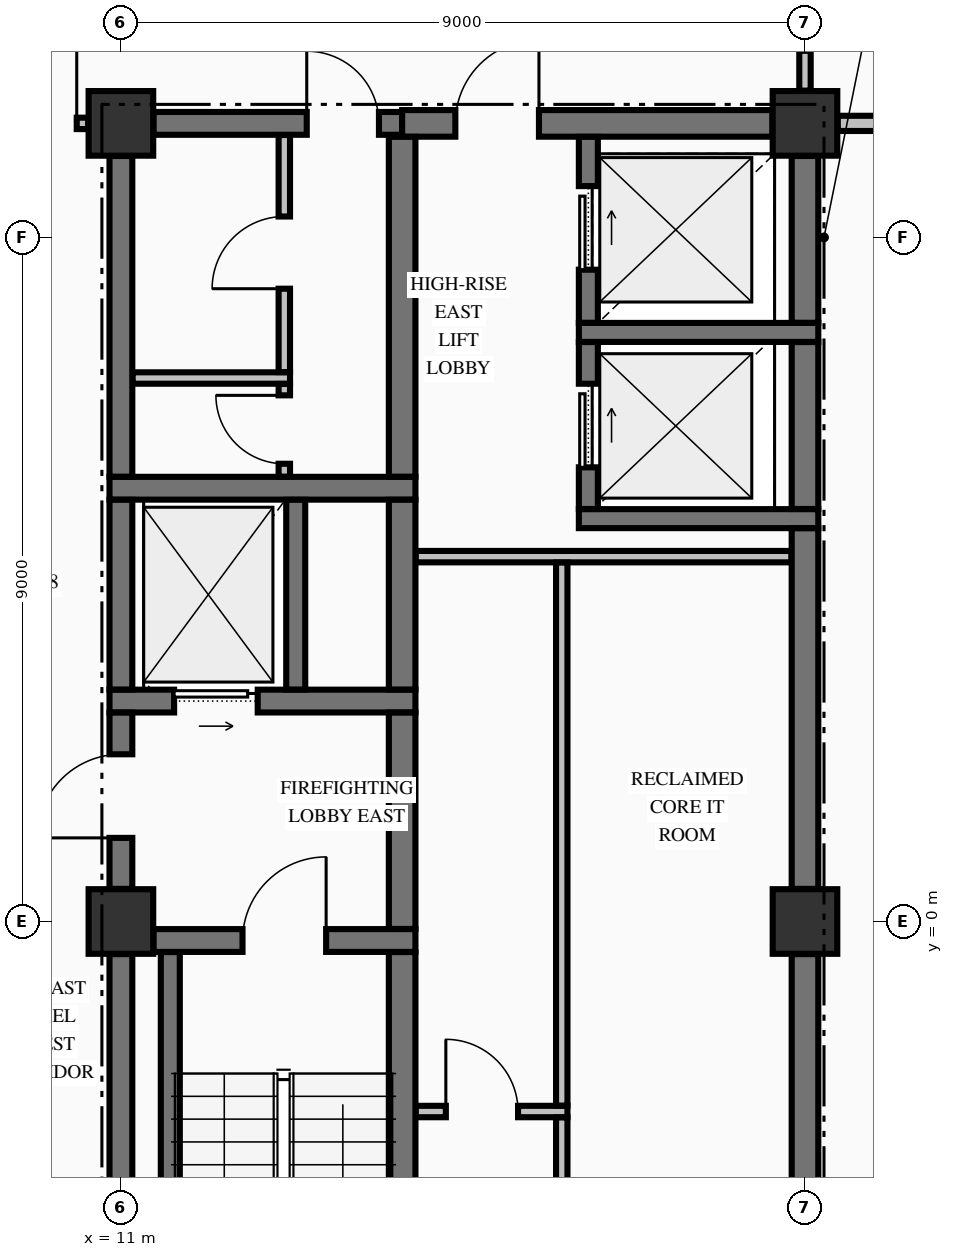
"""IFC4 building model, lengths in metres.
Left out: names, types, materials, properties, quantities, classifications, styles, units other than length and angle.
Written with IfcOpenShell. Run it as: python <this file> out.ifc"""

import sys

from ifc_helpers import new_model, si_unit, direction, frame, frame_2d, origin, origin_2d, place, context, subcontext, project, spatial, rectangle, extrude, element, fill, save


model = new_model("IFC4")
c1 = context("Model", 3, precision=1e-05, world=origin(), true_north=direction((0.0, 1.0)))
c2 = subcontext(c1, "Body", "Model", "MODEL_VIEW")
j1 = project(units=[si_unit("LENGTHUNIT", "METRE"), si_unit("PLANEANGLEUNIT", "RADIAN")], contexts=[c1])
p1 = place(None, origin())
s1 = spatial("IfcSite", under=j1, at=p1, CompositionType="ELEMENT")
p2 = place(p1, origin())
s2 = spatial("IfcBuilding", under=s1, at=p2, CompositionType="ELEMENT")
p3 = place(p2, frame((0.0, 0.0, 176.26)))
s3 = spatial("IfcBuildingStorey", under=s2, at=p3, CompositionType="ELEMENT", Elevation=176.26)
for number, where, z_axis, x_axis in (
    (1, (11.0, 0.0, -0.275), (0.0, 0.0, 1.0), (1.0, 0.0, 0.0)),
    (2, (11.0, 10.5, -0.275), (0.0, 0.0, 1.0), (1.0, 0.0, 0.0)),
    (3, (20.0, 10.5, -0.275), (0.0, 0.0, 1.0), (1.0, 0.0, 0.0)),
    (4, (20.0, 0.0, -0.275), (0.0, 0.0, 1.0), (1.0, 0.0, 0.0)),
):
    element("IfcColumn", number, at=place(p3, frame(where, z_axis=z_axis, x_axis=x_axis)), inside=s3, PredefinedType="COLUMN", context=c2, shape_type="SweptSolid", body=[
        extrude(rectangle(XDim=0.85, YDim=0.85, at=origin_2d()), origin(), (0.0, 0.0, 1.0), 3.425),
    ])
p4 = place(p3, frame((11.429, -0.25, 0.0), z_axis=(0.0, 0.0, 1.0), x_axis=(1.0, 0.0, 0.0)))
e5 = element("IfcWall", 5, at=p4, inside=s3, PredefinedType="SHEAR", context=c2, shape_type="SweptSolid", body=[
    extrude(rectangle(XDim=3.446, YDim=0.3, at=frame_2d((1.723, 0.0))), origin(), (0.0, 0.0, 1.0), 3.15),
])
p5 = place(p4, frame((1.171, 0.0, 0.0)))
e6 = element("IfcOpeningElement", 6, at=p5, cuts=e5, PredefinedType="OPENING", context=c2, shape_type="SweptSolid", body=[
    extrude(rectangle(XDim=1.1, YDim=2.15, at=frame_2d((0.55, 1.075))), frame((0.0, 0.16, 0.0), z_axis=(0.0, -1.0, 0.0), x_axis=(1.0, 0.0, 0.0)), (0.0, 0.0, 1.0), 0.32),
])
p6 = place(p3, frame((10.85, 2.9, 0.0), z_axis=(0.0, 0.0, 1.0), x_axis=(1.0, 0.0, 0.0)))
e7 = element("IfcWall", 7, at=p6, inside=s3, PredefinedType="SHEAR", context=c2, shape_type="SweptSolid", body=[
    extrude(rectangle(XDim=4.025, YDim=0.3, at=frame_2d((2.012, 0.0))), origin(), (0.0, 0.0, 1.0), 3.15),
])
p7 = place(p6, frame((0.85, 0.0, 0.0)))
e8 = element("IfcOpeningElement", 8, at=p7, cuts=e7, PredefinedType="OPENING", context=c2, shape_type="SweptSolid", body=[
    extrude(rectangle(XDim=1.1, YDim=2.2, at=frame_2d((0.55, 1.1))), frame((0.0, 0.16, 0.0), z_axis=(0.0, -1.0, 0.0), x_axis=(1.0, 0.0, 0.0)), (0.0, 0.0, 1.0), 0.32),
])
p8 = place(p3, frame((17.025, 5.3, 0.0), z_axis=(0.0, 0.0, 1.0), x_axis=(1.0, 0.0, 0.0)))
e9 = element("IfcWall", 9, at=p8, inside=s3, PredefinedType="SOLIDWALL", context=c2, shape_type="SweptSolid", body=[
    extrude(rectangle(XDim=3.15, YDim=0.25, at=frame_2d((1.575, 0.0))), origin(), (0.0, 0.0, 1.0), 3.15),
])
p9 = place(p3, frame((10.85, 5.7, 0.0), z_axis=(0.0, 0.0, 1.0), x_axis=(1.0, 0.0, 0.0)))
e10 = element("IfcWall", 10, at=p9, inside=s3, PredefinedType="SHEAR", context=c2, shape_type="SweptSolid", body=[
    extrude(rectangle(XDim=4.025, YDim=0.3, at=frame_2d((2.012, 0.0))), origin(), (0.0, 0.0, 1.0), 3.15),
])
p10 = place(p3, frame((17.025, 7.75, 0.0), z_axis=(0.0, 0.0, 1.0), x_axis=(1.0, 0.0, 0.0)))
e11 = element("IfcWall", 11, at=p10, inside=s3, PredefinedType="SOLIDWALL", context=c2, shape_type="SweptSolid", body=[
    extrude(rectangle(XDim=3.15, YDim=0.25, at=frame_2d((1.575, 0.0))), origin(), (0.0, 0.0, 1.0), 3.15),
])
p11 = place(p3, frame((11.429, 10.5, 0.0), z_axis=(0.0, 0.0, 1.0), x_axis=(1.0, 0.0, 0.0)))
e12 = element("IfcWall", 12, at=p11, inside=s3, PredefinedType="SHEAR", context=c2, shape_type="SweptSolid", body=[
    extrude(rectangle(XDim=3.271, YDim=0.3, at=frame_2d((1.635, 0.0))), origin(), (0.0, 0.0, 1.0), 3.15),
])
p12 = place(p11, frame((2.016, 0.0, 0.0)))
e13 = element("IfcOpeningElement", 13, at=p12, cuts=e12, PredefinedType="OPENING", context=c2, shape_type="SweptSolid", body=[
    extrude(rectangle(XDim=0.95, YDim=2.15, at=frame_2d((0.475, 1.075))), frame((0.0, 0.16, 0.0), z_axis=(0.0, -1.0, 0.0), x_axis=(1.0, 0.0, 0.0)), (0.0, 0.0, 1.0), 0.32),
])
p13 = place(p3, frame((14.7, 10.5, 0.0), z_axis=(0.0, 0.0, 1.0), x_axis=(1.0, 0.0, 0.0)))
e14 = element("IfcWall", 14, at=p13, inside=s3, PredefinedType="SHEAR", context=c2, shape_type="SweptSolid", body=[
    extrude(rectangle(XDim=4.871, YDim=0.35, at=frame_2d((2.436, 0.0))), origin(), (0.0, 0.0, 1.0), 3.15),
])
p14 = place(p13, frame((0.7, 0.0, 0.0)))
e15 = element("IfcOpeningElement", 15, at=p14, cuts=e14, PredefinedType="OPENING", context=c2, shape_type="SweptSolid", body=[
    extrude(rectangle(XDim=1.1, YDim=2.15, at=frame_2d((0.55, 1.075))), frame((0.0, 0.185, 0.0), z_axis=(0.0, -1.0, 0.0), x_axis=(1.0, 0.0, 0.0)), (0.0, 0.0, 1.0), 0.37),
])
p15 = place(p3, frame((14.878, -2.5, 0.0), z_axis=(0.0, 0.0, 1.0), x_axis=(1.0, 0.0, 0.0)))
e16 = element("IfcWall", 16, at=p15, inside=s3, PredefinedType="PARTITIONING", context=c2, shape_type="SweptSolid", body=[
    extrude(rectangle(XDim=1.997, YDim=0.15, at=frame_2d((0.999, 0.0))), origin(), (0.0, 0.0, 1.0), 3.15),
])
p16 = place(p15, frame((0.397, 0.0, 0.0)))
e17 = element("IfcOpeningElement", 17, at=p16, cuts=e16, PredefinedType="OPENING", context=c2, shape_type="SweptSolid", body=[
    extrude(rectangle(XDim=0.95, YDim=2.15, at=frame_2d((0.475, 1.075))), frame((0.0, 0.085, 0.0), z_axis=(0.0, -1.0, 0.0), x_axis=(1.0, 0.0, 0.0)), (0.0, 0.0, 1.0), 0.17),
])
p17 = place(p3, frame((14.878, 4.8, 0.0), z_axis=(0.0, 0.0, 1.0), x_axis=(1.0, 0.0, 0.0)))
e18 = element("IfcWall", 18, at=p17, inside=s3, PredefinedType="PARTITIONING", context=c2, shape_type="SweptSolid", body=[
    extrude(rectangle(XDim=4.944, YDim=0.15, at=frame_2d((2.472, 0.0))), origin(), (0.0, 0.0, 1.0), 3.15),
])
p18 = place(p3, frame((11.153, 7.15, 0.0), z_axis=(0.0, 0.0, 1.0), x_axis=(1.0, 0.0, 0.0)))
e19 = element("IfcWall", 19, at=p18, inside=s3, PredefinedType="PARTITIONING", context=c2, shape_type="SweptSolid", body=[
    extrude(rectangle(XDim=2.072, YDim=0.15, at=frame_2d((1.036, 0.0))), origin(), (0.0, 0.0, 1.0), 3.15),
])
p19 = place(p3, frame((-10.569, 10.5, 0.0), z_axis=(0.0, 0.0, 1.0), x_axis=(1.0, 0.0, 0.0)))
e20 = element("IfcWall", 20, at=p19, inside=s3, PredefinedType="PARTITIONING", context=c2, shape_type="SweptSolid", body=[
    extrude(rectangle(XDim=21.138, YDim=0.15, at=frame_2d((10.569, 0.0))), origin(), (0.0, 0.0, 1.0), 3.15),
])
p20 = place(p19, frame((0.15, 0.0, 0.0)))
e21 = element("IfcOpeningElement", 21, at=p20, cuts=e20, PredefinedType="OPENING", context=c2, shape_type="SweptSolid", body=[
    extrude(rectangle(XDim=1.05, YDim=2.15, at=frame_2d((0.525, 1.075))), frame((0.0, 0.085, 0.0), z_axis=(0.0, -1.0, 0.0), x_axis=(1.0, 0.0, 0.0)), (0.0, 0.0, 1.0), 0.17),
])
p21 = place(p19, frame((19.938, 0.0, 0.0)))
e22 = element("IfcOpeningElement", 22, at=p21, cuts=e20, PredefinedType="OPENING", context=c2, shape_type="SweptSolid", body=[
    extrude(rectangle(XDim=1.05, YDim=2.15, at=frame_2d((0.525, 1.075))), frame((0.0, 0.085, 0.0), z_axis=(0.0, -1.0, 0.0), x_axis=(1.0, 0.0, 0.0)), (0.0, 0.0, 1.0), 0.17),
])
p22 = place(p3, frame((20.431, 10.5, 0.0), z_axis=(0.0, 0.0, 1.0), x_axis=(1.0, 0.0, 0.0)))
e23 = element("IfcWall", 23, at=p22, inside=s3, PredefinedType="PARTITIONING", context=c2, shape_type="SweptSolid", body=[
    extrude(rectangle(XDim=6.404, YDim=0.2, at=frame_2d((3.202, 0.0))), origin(), (0.0, 0.0, 1.0), 3.15),
])
p23 = place(p22, frame((2.594, 0.0, 0.0)))
e24 = element("IfcOpeningElement", 24, at=p23, cuts=e23, PredefinedType="OPENING", context=c2, shape_type="SweptSolid", body=[
    extrude(rectangle(XDim=0.95, YDim=2.15, at=frame_2d((0.475, 1.075))), frame((0.0, 0.11, 0.0), z_axis=(0.0, -1.0, 0.0), x_axis=(1.0, 0.0, 0.0)), (0.0, 0.0, 1.0), 0.22),
])
p24 = place(p3, frame((11.0, -9.521, 0.0), z_axis=(0.0, 0.0, 1.0), x_axis=(0.0, 1.0, 0.0)))
e25 = element("IfcWall", 25, at=p24, inside=s3, PredefinedType="SHEAR", context=c2, shape_type="SweptSolid", body=[
    extrude(rectangle(XDim=9.092, YDim=0.3, at=frame_2d((4.546, 0.0))), origin(), (0.0, 0.0, 1.0), 3.15),
])
p25 = place(p3, frame((11.0, 0.429, 0.0), z_axis=(0.0, 0.0, 1.0), x_axis=(0.0, 1.0, 0.0)))
e26 = element("IfcWall", 26, at=p25, inside=s3, PredefinedType="SHEAR", context=c2, shape_type="SweptSolid", body=[
    extrude(rectangle(XDim=2.319, YDim=0.3, at=frame_2d((1.16, 0.0))), origin(), (0.0, 0.0, 1.0), 3.15),
])
p26 = place(p25, frame((0.671, 0.0, 0.0)))
e27 = element("IfcOpeningElement", 27, at=p26, cuts=e26, PredefinedType="OPENING", context=c2, shape_type="SweptSolid", body=[
    extrude(rectangle(XDim=1.1, YDim=2.15, at=frame_2d((0.55, 1.075))), frame((0.0, 0.16, 0.0), z_axis=(0.0, -1.0, 0.0), x_axis=(1.0, 0.0, 0.0)), (0.0, 0.0, 1.0), 0.32),
])
p27 = place(p3, frame((11.0, 3.052, 0.0), z_axis=(0.0, 0.0, 1.0), x_axis=(0.0, 1.0, 0.0)))
e28 = element("IfcWall", 28, at=p27, inside=s3, PredefinedType="SHEAR", context=c2, shape_type="SweptSolid", body=[
    extrude(rectangle(XDim=2.496, YDim=0.3, at=frame_2d((1.248, 0.0))), origin(), (0.0, 0.0, 1.0), 3.15),
])
p28 = place(p3, frame((11.0, 5.852, 0.0), z_axis=(0.0, 0.0, 1.0), x_axis=(0.0, 1.0, 0.0)))
e29 = element("IfcWall", 29, at=p28, inside=s3, PredefinedType="SHEAR", context=c2, shape_type="SweptSolid", body=[
    extrude(rectangle(XDim=4.219, YDim=0.3, at=frame_2d((2.109, 0.0))), origin(), (0.0, 0.0, 1.0), 3.15),
])
p29 = place(p3, frame((11.65, -9.798, 0.0), z_axis=(0.0, 0.0, 1.0), x_axis=(0.0, 1.0, 0.0)))
e30 = element("IfcWall", 30, at=p29, inside=s3, PredefinedType="SOLIDWALL", context=c2, shape_type="SweptSolid", body=[
    extrude(rectangle(XDim=9.396, YDim=0.25, at=frame_2d((4.698, 0.0))), origin(), (0.0, 0.0, 1.0), 3.15),
])
p30 = place(p3, frame((13.3, 3.052, 0.0), z_axis=(0.0, 0.0, 1.0), x_axis=(0.0, 1.0, 0.0)))
e31 = element("IfcWall", 31, at=p30, inside=s3, PredefinedType="SOLIDWALL", context=c2, shape_type="SweptSolid", body=[
    extrude(rectangle(XDim=2.496, YDim=0.25, at=frame_2d((1.248, 0.0))), origin(), (0.0, 0.0, 1.0), 3.15),
])
p31 = place(p3, frame((14.7, -9.773, 0.0), z_axis=(0.0, 0.0, 1.0), x_axis=(0.0, 1.0, 0.0)))
e32 = element("IfcWall", 32, at=p31, inside=s3, PredefinedType="SHEAR", context=c2, shape_type="SweptSolid", body=[
    extrude(rectangle(XDim=9.371, YDim=0.35, at=frame_2d((4.686, 0.0))), origin(), (0.0, 0.0, 1.0), 3.15),
])
p32 = place(p3, frame((14.7, -0.098, 0.0), z_axis=(0.0, 0.0, 1.0), x_axis=(0.0, 1.0, 0.0)))
e33 = element("IfcWall", 33, at=p32, inside=s3, PredefinedType="SHEAR", context=c2, shape_type="SweptSolid", body=[
    extrude(rectangle(XDim=2.846, YDim=0.35, at=frame_2d((1.423, 0.0))), origin(), (0.0, 0.0, 1.0), 3.15),
])
p33 = place(p3, frame((14.7, 3.052, 0.0), z_axis=(0.0, 0.0, 1.0), x_axis=(0.0, 1.0, 0.0)))
e34 = element("IfcWall", 34, at=p33, inside=s3, PredefinedType="SHEAR", context=c2, shape_type="SweptSolid", body=[
    extrude(rectangle(XDim=2.496, YDim=0.35, at=frame_2d((1.248, 0.0))), origin(), (0.0, 0.0, 1.0), 3.15),
])
p34 = place(p3, frame((14.7, 5.852, 0.0), z_axis=(0.0, 0.0, 1.0), x_axis=(0.0, 1.0, 0.0)))
e35 = element("IfcWall", 35, at=p34, inside=s3, PredefinedType="SHEAR", context=c2, shape_type="SweptSolid", body=[
    extrude(rectangle(XDim=4.471, YDim=0.35, at=frame_2d((2.235, 0.0))), origin(), (0.0, 0.0, 1.0), 3.15),
])
p35 = place(p3, frame((17.15, 5.427, 0.0), z_axis=(0.0, 0.0, 1.0), x_axis=(0.0, 1.0, 0.0)))
e36 = element("IfcWall", 36, at=p35, inside=s3, PredefinedType="SOLIDWALL", context=c2, shape_type="SweptSolid", body=[
    extrude(rectangle(XDim=2.196, YDim=0.25, at=frame_2d((1.098, 0.0))), origin(), (0.0, 0.0, 1.0), 3.15),
])
p36 = place(p35, frame((0.548, 0.0, 0.0)))
e37 = element("IfcOpeningElement", 37, at=p36, cuts=e36, PredefinedType="OPENING", context=c2, shape_type="SweptSolid", body=[
    extrude(rectangle(XDim=1.1, YDim=2.2, at=frame_2d((0.55, 1.1))), frame((0.0, 0.135, 0.0), z_axis=(0.0, -1.0, 0.0), x_axis=(1.0, 0.0, 0.0)), (0.0, 0.0, 1.0), 0.27),
])
p37 = place(p3, frame((17.15, 7.877, 0.0), z_axis=(0.0, 0.0, 1.0), x_axis=(0.0, 1.0, 0.0)))
e38 = element("IfcWall", 38, at=p37, inside=s3, PredefinedType="SOLIDWALL", context=c2, shape_type="SweptSolid", body=[
    extrude(rectangle(XDim=2.446, YDim=0.25, at=frame_2d((1.223, 0.0))), origin(), (0.0, 0.0, 1.0), 3.15),
])
p38 = place(p37, frame((0.698, 0.0, 0.0)))
e39 = element("IfcOpeningElement", 39, at=p38, cuts=e38, PredefinedType="OPENING", context=c2, shape_type="SweptSolid", body=[
    extrude(rectangle(XDim=1.1, YDim=2.2, at=frame_2d((0.55, 1.1))), frame((0.0, 0.135, 0.0), z_axis=(0.0, -1.0, 0.0), x_axis=(1.0, 0.0, 0.0)), (0.0, 0.0, 1.0), 0.27),
])
p39 = place(p3, frame((20.0, -9.521, 0.0), z_axis=(0.0, 0.0, 1.0), x_axis=(0.0, 1.0, 0.0)))
e40 = element("IfcWall", 40, at=p39, inside=s3, PredefinedType="SHEAR", context=c2, shape_type="SweptSolid", body=[
    extrude(rectangle(XDim=9.092, YDim=0.35, at=frame_2d((4.546, 0.0))), origin(), (0.0, 0.0, 1.0), 3.15),
])
p40 = place(p3, frame((20.0, 0.429, 0.0), z_axis=(0.0, 0.0, 1.0), x_axis=(0.0, 1.0, 0.0)))
e41 = element("IfcWall", 41, at=p40, inside=s3, PredefinedType="SHEAR", context=c2, shape_type="SweptSolid", body=[
    extrude(rectangle(XDim=4.744, YDim=0.35, at=frame_2d((2.372, 0.0))), origin(), (0.0, 0.0, 1.0), 3.15),
])
p41 = place(p3, frame((20.0, 5.427, 0.0), z_axis=(0.0, 0.0, 1.0), x_axis=(0.0, 1.0, 0.0)))
e42 = element("IfcWall", 42, at=p41, inside=s3, PredefinedType="SHEAR", context=c2, shape_type="SweptSolid", body=[
    extrude(rectangle(XDim=2.196, YDim=0.35, at=frame_2d((1.098, 0.0))), origin(), (0.0, 0.0, 1.0), 3.15),
])
p42 = place(p3, frame((20.0, 7.877, 0.0), z_axis=(0.0, 0.0, 1.0), x_axis=(0.0, 1.0, 0.0)))
e43 = element("IfcWall", 43, at=p42, inside=s3, PredefinedType="SHEAR", context=c2, shape_type="SweptSolid", body=[
    extrude(rectangle(XDim=2.194, YDim=0.35, at=frame_2d((1.097, 0.0))), origin(), (0.0, 0.0, 1.0), 3.15),
])
p43 = place(p3, frame((13.15, 5.853, 0.0), z_axis=(0.0, 0.0, 1.0), x_axis=(0.0, 1.0, 0.0)))
e44 = element("IfcWall", 44, at=p43, inside=s3, PredefinedType="PARTITIONING", context=c2, shape_type="SweptSolid", body=[
    extrude(rectangle(XDim=1.219, YDim=0.15, at=frame_2d((0.609, 0.0))), origin(), (0.0, 0.0, 1.0), 3.15),
])
p44 = place(p43, frame((0.169, 0.0, 0.0)))
e45 = element("IfcOpeningElement", 45, at=p44, cuts=e44, PredefinedType="OPENING", context=c2, shape_type="SweptSolid", body=[
    extrude(rectangle(XDim=0.9, YDim=2.15, at=frame_2d((0.45, 1.075))), frame((0.0, 0.085, 0.0), z_axis=(0.0, -1.0, 0.0), x_axis=(1.0, 0.0, 0.0)), (0.0, 0.0, 1.0), 0.17),
])
p45 = place(p3, frame((13.15, 7.228, 0.0), z_axis=(0.0, 0.0, 1.0), x_axis=(0.0, 1.0, 0.0)))
e46 = element("IfcWall", 46, at=p45, inside=s3, PredefinedType="PARTITIONING", context=c2, shape_type="SweptSolid", body=[
    extrude(rectangle(XDim=3.119, YDim=0.15, at=frame_2d((1.56, 0.0))), origin(), (0.0, 0.0, 1.0), 3.15),
])
p46 = place(p45, frame((1.097, 0.0, 0.0)))
e47 = element("IfcOpeningElement", 47, at=p46, cuts=e46, PredefinedType="OPENING", context=c2, shape_type="SweptSolid", body=[
    extrude(rectangle(XDim=0.95, YDim=2.15, at=frame_2d((0.475, 1.075))), frame((0.0, 0.085, 0.0), z_axis=(0.0, -1.0, 0.0), x_axis=(1.0, 0.0, 0.0)), (0.0, 0.0, 1.0), 0.17),
])
p47 = place(p3, frame((16.8, -9.772, 0.0), z_axis=(0.0, 0.0, 1.0), x_axis=(0.0, 1.0, 0.0)))
e48 = element("IfcWall", 48, at=p47, inside=s3, PredefinedType="PARTITIONING", context=c2, shape_type="SweptSolid", body=[
    extrude(rectangle(XDim=7.194, YDim=0.15, at=frame_2d((3.597, 0.0))), origin(), (0.0, 0.0, 1.0), 3.15),
])
p48 = place(p3, frame((16.8, -2.422, 0.0), z_axis=(0.0, 0.0, 1.0), x_axis=(0.0, 1.0, 0.0)))
e49 = element("IfcWall", 49, at=p48, inside=s3, PredefinedType="PARTITIONING", context=c2, shape_type="SweptSolid", body=[
    extrude(rectangle(XDim=7.144, YDim=0.15, at=frame_2d((3.572, 0.0))), origin(), (0.0, 0.0, 1.0), 3.15),
])
p49 = place(p3, frame((20.0, 10.931, 0.0), z_axis=(0.0, 0.0, 1.0), x_axis=(0.0, 1.0, 0.0)))
e50 = element("IfcWall", 50, at=p49, inside=s3, PredefinedType="PARTITIONING", context=c2, shape_type="SweptSolid", body=[
    extrude(rectangle(XDim=2.316, YDim=0.15, at=frame_2d((1.158, 0.0))), origin(), (0.0, 0.0, 1.0), 2.342),
])
p50 = place(p49, frame((0.524, 0.0, 0.0)))
e51 = element("IfcOpeningElement", 51, at=p50, cuts=e50, PredefinedType="OPENING", context=c2, shape_type="SweptSolid", body=[
    extrude(rectangle(XDim=0.95, YDim=2.15, at=frame_2d((0.475, 1.075))), frame((0.0, 0.085, 0.0), z_axis=(0.0, -1.0, 0.0), x_axis=(1.0, 0.0, 0.0)), (0.0, 0.0, 1.0), 0.17),
])
p51 = place(p5, origin())
e52 = element("IfcDoor", 52, at=p51, inside=s3, OperationType="SINGLE_SWING_RIGHT", PredefinedType="DOOR", context=c2, shape_type="SweptSolid", body=[
    extrude(rectangle(XDim=1.1, YDim=2.15, at=frame_2d((0.55, 1.075))), frame((0.0, 0.025, 0.0), z_axis=(0.0, -1.0, 0.0), x_axis=(1.0, 0.0, 0.0)), (0.0, 0.0, 1.0), 0.05),
])
fill(e6, e52)
p52 = place(p26, origin())
e53 = element("IfcDoor", 53, at=p52, inside=s3, OperationType="SINGLE_SWING_LEFT", PredefinedType="DOOR", context=c2, shape_type="SweptSolid", body=[
    extrude(rectangle(XDim=1.1, YDim=2.15, at=frame_2d((0.55, 1.075))), frame((0.0, 0.025, 0.0), z_axis=(0.0, -1.0, 0.0), x_axis=(1.0, 0.0, 0.0)), (0.0, 0.0, 1.0), 0.05),
])
fill(e27, e53)
p53 = place(p7, origin())
e54 = element("IfcDoor", 54, at=p53, inside=s3, OperationType="SLIDING_TO_RIGHT", PredefinedType="DOOR", context=c2, shape_type="SweptSolid", body=[
    extrude(rectangle(XDim=1.1, YDim=2.2, at=frame_2d((0.55, 1.1))), frame((0.0, 0.025, 0.0), z_axis=(0.0, -1.0, 0.0), x_axis=(1.0, 0.0, 0.0)), (0.0, 0.0, 1.0), 0.05),
])
fill(e8, e54)
p54 = place(p12, origin())
e55 = element("IfcDoor", 55, at=p54, inside=s3, OperationType="SINGLE_SWING_LEFT", PredefinedType="DOOR", context=c2, shape_type="SweptSolid", body=[
    extrude(rectangle(XDim=0.95, YDim=2.15, at=frame_2d((0.475, 1.075))), frame((0.0, 0.025, 0.0), z_axis=(0.0, -1.0, 0.0), x_axis=(1.0, 0.0, 0.0)), (0.0, 0.0, 1.0), 0.05),
])
fill(e13, e55)
p55 = place(p44, origin())
e56 = element("IfcDoor", 56, at=p55, inside=s3, OperationType="SINGLE_SWING_RIGHT", PredefinedType="DOOR", context=c2, shape_type="SweptSolid", body=[
    extrude(rectangle(XDim=0.9, YDim=2.15, at=frame_2d((0.45, 1.075))), frame((0.0, 0.025, 0.0), z_axis=(0.0, -1.0, 0.0), x_axis=(1.0, 0.0, 0.0)), (0.0, 0.0, 1.0), 0.05),
])
fill(e45, e56)
p56 = place(p46, origin())
e57 = element("IfcDoor", 57, at=p56, inside=s3, OperationType="SINGLE_SWING_LEFT", PredefinedType="DOOR", context=c2, shape_type="SweptSolid", body=[
    extrude(rectangle(XDim=0.95, YDim=2.15, at=frame_2d((0.475, 1.075))), frame((0.0, 0.025, 0.0), z_axis=(0.0, -1.0, 0.0), x_axis=(1.0, 0.0, 0.0)), (0.0, 0.0, 1.0), 0.05),
])
fill(e47, e57)
p57 = place(p36, origin())
e58 = element("IfcDoor", 58, at=p57, inside=s3, OperationType="SLIDING_TO_RIGHT", PredefinedType="DOOR", context=c2, shape_type="SweptSolid", body=[
    extrude(rectangle(XDim=1.1, YDim=2.2, at=frame_2d((0.55, 1.1))), frame((0.0, 0.025, 0.0), z_axis=(0.0, -1.0, 0.0), x_axis=(1.0, 0.0, 0.0)), (0.0, 0.0, 1.0), 0.05),
])
fill(e37, e58)
p58 = place(p38, origin())
e59 = element("IfcDoor", 59, at=p58, inside=s3, OperationType="SLIDING_TO_RIGHT", PredefinedType="DOOR", context=c2, shape_type="SweptSolid", body=[
    extrude(rectangle(XDim=1.1, YDim=2.2, at=frame_2d((0.55, 1.1))), frame((0.0, 0.025, 0.0), z_axis=(0.0, -1.0, 0.0), x_axis=(1.0, 0.0, 0.0)), (0.0, 0.0, 1.0), 0.05),
])
fill(e39, e59)
p59 = place(p14, origin())
e60 = element("IfcDoor", 60, at=p59, inside=s3, OperationType="SINGLE_SWING_RIGHT", PredefinedType="DOOR", context=c2, shape_type="SweptSolid", body=[
    extrude(rectangle(XDim=1.1, YDim=2.15, at=frame_2d((0.55, 1.075))), frame((0.0, 0.025, 0.0), z_axis=(0.0, -1.0, 0.0), x_axis=(1.0, 0.0, 0.0)), (0.0, 0.0, 1.0), 0.05),
])
fill(e15, e60)
p60 = place(p16, origin())
e61 = element("IfcDoor", 61, at=p60, inside=s3, OperationType="SINGLE_SWING_LEFT", PredefinedType="DOOR", context=c2, shape_type="SweptSolid", body=[
    extrude(rectangle(XDim=0.95, YDim=2.15, at=frame_2d((0.475, 1.075))), frame((0.0, 0.025, 0.0), z_axis=(0.0, -1.0, 0.0), x_axis=(1.0, 0.0, 0.0)), (0.0, 0.0, 1.0), 0.05),
])
fill(e17, e61)
p61 = place(p21, origin())
e62 = element("IfcDoor", 62, at=p61, inside=s3, OperationType="SINGLE_SWING_RIGHT", PredefinedType="DOOR", context=c2, shape_type="SweptSolid", body=[
    extrude(rectangle(XDim=1.05, YDim=2.15, at=frame_2d((0.525, 1.075))), frame((0.0, 0.025, 0.0), z_axis=(0.0, -1.0, 0.0), x_axis=(1.0, 0.0, 0.0)), (0.0, 0.0, 1.0), 0.05),
])
fill(e22, e62)
save(model, sys.argv[1])
